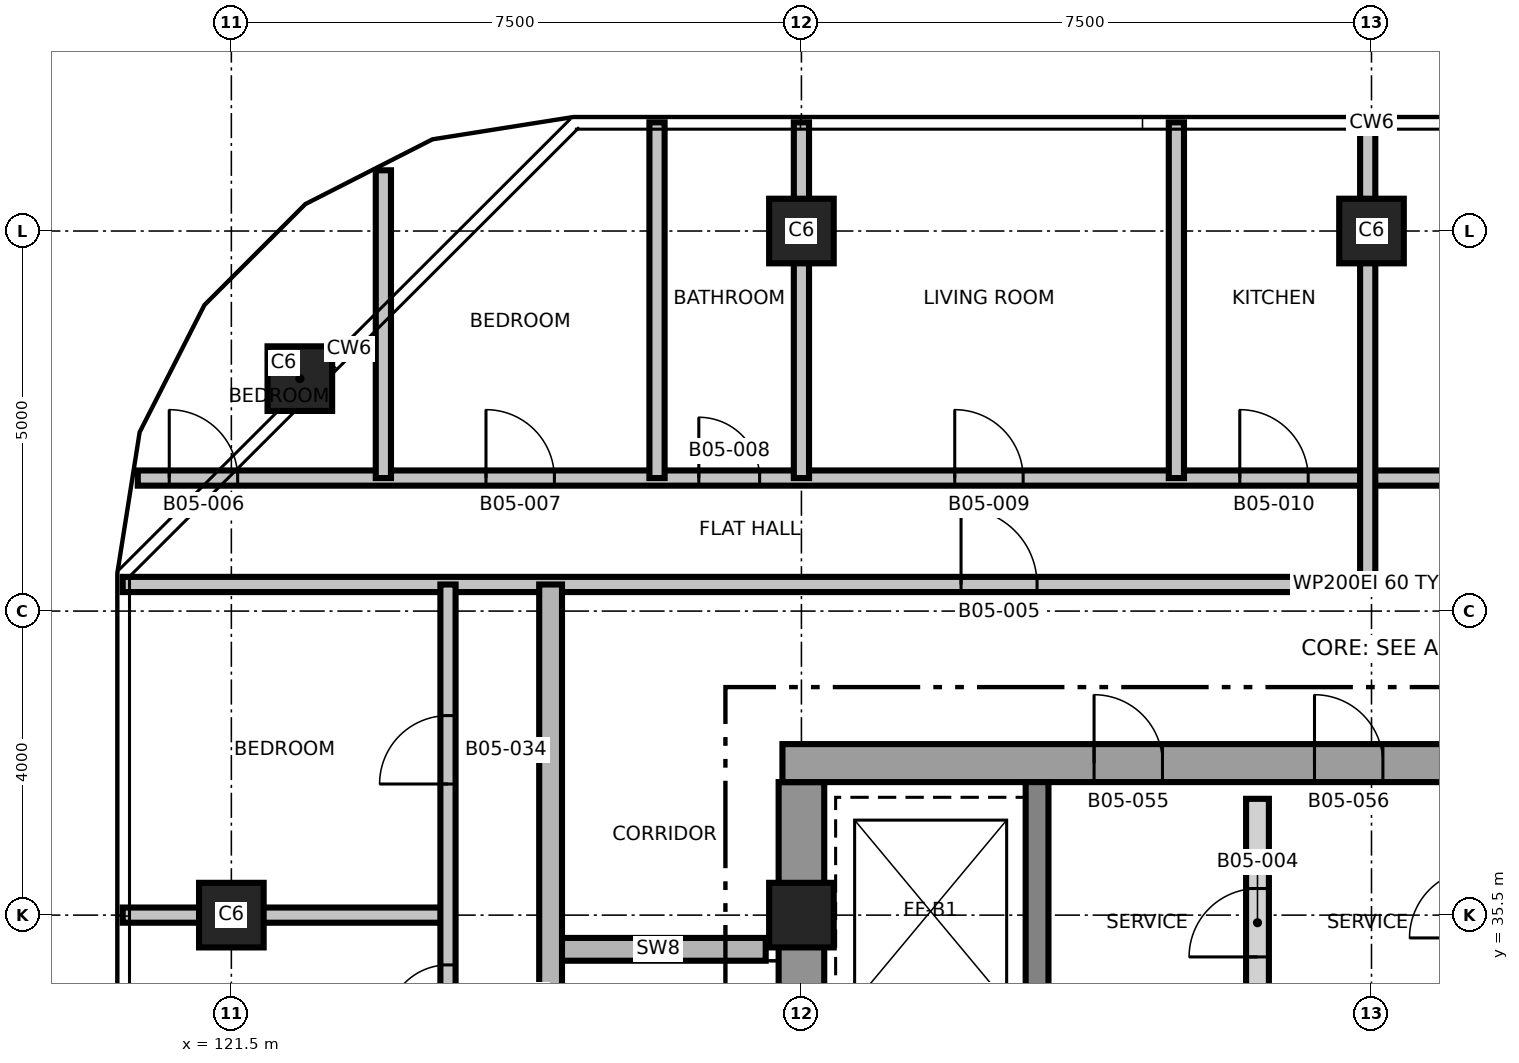
"""IFC4 building model, lengths in metres.
Left out: names, types, materials, properties, quantities, classifications, styles, units other than length and angle.
Written with IfcOpenShell. Run it as: python <this file> out.ifc"""

import sys

from ifc_helpers import new_model, si_unit, direction, frame, frame_2d, origin, origin_2d, place, context, subcontext, project, spatial, rectangle, extrude, element, fill, save


model = new_model("IFC4")
c1 = context("Model", 3, precision=1e-05, world=origin(), true_north=direction((0.0, 1.0)))
c2 = subcontext(c1, "Body", "Model", "MODEL_VIEW")
j1 = project(units=[si_unit("LENGTHUNIT", "METRE"), si_unit("PLANEANGLEUNIT", "RADIAN")], contexts=[c1])
p1 = place(None, origin())
s1 = spatial("IfcSite", under=j1, at=p1, CompositionType="ELEMENT")
p2 = place(p1, origin())
s2 = spatial("IfcBuilding", under=s1, at=p2, CompositionType="ELEMENT")
p3 = place(p2, frame((0.0, 0.0, 70.5)))
s3 = spatial("IfcBuildingStorey", under=s2, at=p3, CompositionType="ELEMENT", Elevation=70.5)
p4 = place(p3, frame((129.0, 24.75, 0.0), z_axis=(0.0, 0.0, 1.0), x_axis=(0.0, 1.0, 0.0)))
e1 = element("IfcWall", 1, at=p4, inside=s3, PredefinedType="SHEAR", context=c2, shape_type="SweptSolid", body=[
    extrude(rectangle(XDim=12.5, YDim=0.6, at=frame_2d((6.25, 0.0))), origin(), (0.0, 0.0, 1.0), 3.7),
])
p5 = place(p4, frame((5.15, 0.0, 0.0)))
e2 = element("IfcOpeningElement", 2, at=p5, cuts=e1, PredefinedType="OPENING", context=c2, shape_type="SweptSolid", body=[
    extrude(rectangle(XDim=1.0, YDim=2.1, at=frame_2d((0.5, 1.05))), frame((0.0, 0.31, 0.0), z_axis=(0.0, -1.0, 0.0), x_axis=(1.0, 0.0, 0.0)), (0.0, 0.0, 1.0), 0.62),
])
p6 = place(p3, frame((128.75, 37.5, 0.0), z_axis=(0.0, 0.0, 1.0), x_axis=(1.0, 0.0, 0.0)))
e3 = element("IfcWall", 3, at=p6, inside=s3, PredefinedType="SHEAR", context=c2, shape_type="SweptSolid", body=[
    extrude(rectangle(XDim=15.0, YDim=0.5, at=frame_2d((7.5, 0.0))), origin(), (0.0, 0.0, 1.0), 3.7),
])
p7 = place(p6, frame((9.65, 0.0, 0.0)))
e4 = element("IfcOpeningElement", 4, at=p7, cuts=e3, PredefinedType="OPENING", context=c2, shape_type="SweptSolid", body=[
    extrude(rectangle(XDim=1.5, YDim=2.1, at=frame_2d((0.75, 1.05))), frame((0.0, 0.26, 0.0), z_axis=(0.0, -1.0, 0.0), x_axis=(1.0, 0.0, 0.0)), (0.0, 0.0, 1.0), 0.52),
])
p8 = place(p6, frame((12.85, 0.0, 0.0)))
e5 = element("IfcOpeningElement", 5, at=p8, cuts=e3, PredefinedType="OPENING", context=c2, shape_type="SweptSolid", body=[
    extrude(rectangle(XDim=0.9, YDim=2.1, at=frame_2d((0.45, 1.05))), frame((0.0, 0.26, 0.0), z_axis=(0.0, -1.0, 0.0), x_axis=(1.0, 0.0, 0.0)), (0.0, 0.0, 1.0), 0.52),
])
p9 = place(p6, frame((4.1, 0.0, 0.0)))
e6 = element("IfcOpeningElement", 6, at=p9, cuts=e3, PredefinedType="OPENING", context=c2, shape_type="SweptSolid", body=[
    extrude(rectangle(XDim=0.9, YDim=2.1, at=frame_2d((0.45, 1.05))), frame((0.0, 0.26, 0.0), z_axis=(0.0, -1.0, 0.0), x_axis=(1.0, 0.0, 0.0)), (0.0, 0.0, 1.0), 0.52),
])
p10 = place(p6, frame((7.0, 0.0, 0.0)))
e7 = element("IfcOpeningElement", 7, at=p10, cuts=e3, PredefinedType="OPENING", context=c2, shape_type="SweptSolid", body=[
    extrude(rectangle(XDim=0.9, YDim=2.1, at=frame_2d((0.45, 1.05))), frame((0.0, 0.26, 0.0), z_axis=(0.0, -1.0, 0.0), x_axis=(1.0, 0.0, 0.0)), (0.0, 0.0, 1.0), 0.52),
])
p11 = place(p3, frame((132.1, 24.75, 0.0), z_axis=(0.0, 0.0, 1.0), x_axis=(0.0, 1.0, 0.0)))
e8 = element("IfcWall", 8, at=p11, inside=s3, PredefinedType="SHEAR", context=c2, shape_type="SweptSolid", body=[
    extrude(rectangle(XDim=12.5, YDim=0.3, at=frame_2d((6.25, 0.0))), origin(), (0.0, 0.0, 1.0), 3.7),
])
p12 = place(p11, frame((3.9, 0.0, 0.0)))
e9 = element("IfcOpeningElement", 9, at=p12, cuts=e8, PredefinedType="OPENING", context=c2, shape_type="SweptSolid", body=[
    extrude(rectangle(XDim=1.2, YDim=2.1, at=frame_2d((0.6, 1.05))), frame((0.0, 0.16, 0.0), z_axis=(0.0, -1.0, 0.0), x_axis=(1.0, 0.0, 0.0)), (0.0, 0.0, 1.0), 0.32),
])
for number, where, z_axis, x_axis in (
    (10, (121.5, 35.5, 0.0), (0.0, 0.0, 1.0), (1.0, 0.0, 0.0)),
    (11, (129.0, 35.5, 0.0), (0.0, 0.0, 1.0), (1.0, 0.0, 0.0)),
    (12, (122.401, 42.558, 0.0), (0.0, 0.0, 1.0), (1.0, 0.0, 0.0)),
    (13, (129.0, 44.5, 0.0), (0.0, 0.0, 1.0), (1.0, 0.0, 0.0)),
    (14, (136.5, 44.5, 0.0), (0.0, 0.0, 1.0), (1.0, 0.0, 0.0)),
):
    element("IfcColumn", number, at=place(p3, frame(where, z_axis=z_axis, x_axis=x_axis)), inside=s3, PredefinedType="COLUMN", context=c2, shape_type="SweptSolid", body=[
        extrude(rectangle(XDim=0.85, YDim=0.85, at=origin_2d()), origin(), (0.0, 0.0, 1.0), 3.7),
    ])
p13 = place(p3, frame((125.7, 35.05, 0.0), z_axis=(0.0, 0.0, 1.0), x_axis=(1.0, 0.0, 0.0)))
e15 = element("IfcWall", 15, at=p13, inside=s3, PredefinedType="SHEAR", context=c2, shape_type="SweptSolid", body=[
    extrude(rectangle(XDim=2.83, YDim=0.3, at=frame_2d((1.415, 0.0))), origin(), (0.0, 0.0, 1.0), 3.4),
])
p14 = place(p3, frame((120.07, 35.5, 0.0), z_axis=(0.0, 0.0, 1.0), x_axis=(1.0, 0.0, 0.0)))
e16 = element("IfcWall", 16, at=p14, inside=s3, PredefinedType="PARTITIONING", context=c2, shape_type="SweptSolid", body=[
    extrude(rectangle(XDim=4.28, YDim=0.2, at=frame_2d((2.14, 0.0))), origin(), (0.0, 0.0, 1.0), 3.4),
])
p15 = place(p3, frame((120.07, 39.85, 0.0), z_axis=(0.0, 0.0, 1.0), x_axis=(1.0, 0.0, 0.0)))
e17 = element("IfcWall", 17, at=p15, inside=s3, PredefinedType="PARTITIONING", context=c2, shape_type="SweptSolid", body=[
    extrude(rectangle(XDim=32.86, YDim=0.2, at=frame_2d((16.43, 0.0))), origin(), (0.0, 0.0, 1.0), 3.4),
])
p16 = place(p15, frame((11.03, 0.0, 0.0)))
e18 = element("IfcOpeningElement", 18, at=p16, cuts=e17, PredefinedType="OPENING", context=c2, shape_type="SweptSolid", body=[
    extrude(rectangle(XDim=1.0, YDim=2.1, at=frame_2d((0.5, 1.05))), frame((0.0, 0.11, 0.0), z_axis=(0.0, -1.0, 0.0), x_axis=(1.0, 0.0, 0.0)), (0.0, 0.0, 1.0), 0.22),
])
p17 = place(p15, frame((20.83, 0.0, 0.0)))
e19 = element("IfcOpeningElement", 19, at=p17, cuts=e17, PredefinedType="OPENING", context=c2, shape_type="SweptSolid", body=[
    extrude(rectangle(XDim=1.0, YDim=2.1, at=frame_2d((0.5, 1.05))), frame((0.0, 0.11, 0.0), z_axis=(0.0, -1.0, 0.0), x_axis=(1.0, 0.0, 0.0)), (0.0, 0.0, 1.0), 0.22),
])
p18 = place(p3, frame((120.269, 41.25, 0.0), z_axis=(0.0, 0.0, 1.0), x_axis=(1.0, 0.0, 0.0)))
e20 = element("IfcWall", 20, at=p18, inside=s3, PredefinedType="PARTITIONING", context=c2, shape_type="SweptSolid", body=[
    extrude(rectangle(XDim=32.462, YDim=0.2, at=frame_2d((16.231, 0.0))), origin(), (0.0, 0.0, 1.0), 3.4),
])
p19 = place(p18, frame((0.414, 0.0, 0.0)))
e21 = element("IfcOpeningElement", 21, at=p19, cuts=e20, PredefinedType="OPENING", context=c2, shape_type="SweptSolid", body=[
    extrude(rectangle(XDim=0.9, YDim=2.1, at=frame_2d((0.45, 1.05))), frame((0.0, 0.11, 0.0), z_axis=(0.0, -1.0, 0.0), x_axis=(1.0, 0.0, 0.0)), (0.0, 0.0, 1.0), 0.22),
])
p20 = place(p18, frame((4.581, 0.0, 0.0)))
e22 = element("IfcOpeningElement", 22, at=p20, cuts=e20, PredefinedType="OPENING", context=c2, shape_type="SweptSolid", body=[
    extrude(rectangle(XDim=0.9, YDim=2.1, at=frame_2d((0.45, 1.05))), frame((0.0, 0.11, 0.0), z_axis=(0.0, -1.0, 0.0), x_axis=(1.0, 0.0, 0.0)), (0.0, 0.0, 1.0), 0.22),
])
p21 = place(p18, frame((7.381, 0.0, 0.0)))
e23 = element("IfcOpeningElement", 23, at=p21, cuts=e20, PredefinedType="OPENING", context=c2, shape_type="SweptSolid", body=[
    extrude(rectangle(XDim=0.8, YDim=2.1, at=frame_2d((0.4, 1.05))), frame((0.0, 0.11, 0.0), z_axis=(0.0, -1.0, 0.0), x_axis=(1.0, 0.0, 0.0)), (0.0, 0.0, 1.0), 0.22),
])
p22 = place(p18, frame((10.748, 0.0, 0.0)))
e24 = element("IfcOpeningElement", 24, at=p22, cuts=e20, PredefinedType="OPENING", context=c2, shape_type="SweptSolid", body=[
    extrude(rectangle(XDim=0.9, YDim=2.1, at=frame_2d((0.45, 1.05))), frame((0.0, 0.11, 0.0), z_axis=(0.0, -1.0, 0.0), x_axis=(1.0, 0.0, 0.0)), (0.0, 0.0, 1.0), 0.22),
])
p23 = place(p18, frame((14.498, 0.0, 0.0)))
e25 = element("IfcOpeningElement", 25, at=p23, cuts=e20, PredefinedType="OPENING", context=c2, shape_type="SweptSolid", body=[
    extrude(rectangle(XDim=0.9, YDim=2.1, at=frame_2d((0.45, 1.05))), frame((0.0, 0.11, 0.0), z_axis=(0.0, -1.0, 0.0), x_axis=(1.0, 0.0, 0.0)), (0.0, 0.0, 1.0), 0.22),
])
p24 = place(p18, frame((18.248, 0.0, 0.0)))
e26 = element("IfcOpeningElement", 26, at=p24, cuts=e20, PredefinedType="OPENING", context=c2, shape_type="SweptSolid", body=[
    extrude(rectangle(XDim=0.9, YDim=2.1, at=frame_2d((0.45, 1.05))), frame((0.0, 0.11, 0.0), z_axis=(0.0, -1.0, 0.0), x_axis=(1.0, 0.0, 0.0)), (0.0, 0.0, 1.0), 0.22),
])
p25 = place(p18, frame((21.998, 0.0, 0.0)))
e27 = element("IfcOpeningElement", 27, at=p25, cuts=e20, PredefinedType="OPENING", context=c2, shape_type="SweptSolid", body=[
    extrude(rectangle(XDim=0.9, YDim=2.1, at=frame_2d((0.45, 1.05))), frame((0.0, 0.11, 0.0), z_axis=(0.0, -1.0, 0.0), x_axis=(1.0, 0.0, 0.0)), (0.0, 0.0, 1.0), 0.22),
])
p26 = place(p18, frame((24.842, 0.0, 0.0)))
e28 = element("IfcOpeningElement", 28, at=p26, cuts=e20, PredefinedType="OPENING", context=c2, shape_type="SweptSolid", body=[
    extrude(rectangle(XDim=0.8, YDim=2.1, at=frame_2d((0.4, 1.05))), frame((0.0, 0.11, 0.0), z_axis=(0.0, -1.0, 0.0), x_axis=(1.0, 0.0, 0.0)), (0.0, 0.0, 1.0), 0.22),
])
p27 = place(p18, frame((28.659, 0.0, 0.0)))
e29 = element("IfcOpeningElement", 29, at=p27, cuts=e20, PredefinedType="OPENING", context=c2, shape_type="SweptSolid", body=[
    extrude(rectangle(XDim=0.9, YDim=2.1, at=frame_2d((0.45, 1.05))), frame((0.0, 0.11, 0.0), z_axis=(0.0, -1.0, 0.0), x_axis=(1.0, 0.0, 0.0)), (0.0, 0.0, 1.0), 0.22),
])
p28 = place(p3, frame((123.5, 41.25, 0.0), z_axis=(0.0, 0.0, 1.0), x_axis=(0.0, 1.0, 0.0)))
e30 = element("IfcWall", 30, at=p28, inside=s3, PredefinedType="PARTITIONING", context=c2, shape_type="SweptSolid", body=[
    extrude(rectangle(XDim=4.049, YDim=0.2, at=frame_2d((2.024, 0.0))), origin(), (0.0, 0.0, 1.0), 3.4),
])
p29 = place(p3, frame((124.35, 22.15, 0.0), z_axis=(0.0, 0.0, 1.0), x_axis=(0.0, 1.0, 0.0)))
e31 = element("IfcWall", 31, at=p29, inside=s3, PredefinedType="PARTITIONING", context=c2, shape_type="SweptSolid", body=[
    extrude(rectangle(XDim=17.7, YDim=0.2, at=frame_2d((8.85, 0.0))), origin(), (0.0, 0.0, 1.0), 3.4),
])
p30 = place(p29, frame((1.028, 0.0, 0.0)))
e32 = element("IfcOpeningElement", 32, at=p30, cuts=e31, PredefinedType="OPENING", context=c2, shape_type="SweptSolid", body=[
    extrude(rectangle(XDim=0.9, YDim=2.1, at=frame_2d((0.45, 1.05))), frame((0.0, 0.11, 0.0), z_axis=(0.0, -1.0, 0.0), x_axis=(1.0, 0.0, 0.0)), (0.0, 0.0, 1.0), 0.22),
])
p31 = place(p29, frame((3.253, 0.0, 0.0)))
e33 = element("IfcOpeningElement", 33, at=p31, cuts=e31, PredefinedType="OPENING", context=c2, shape_type="SweptSolid", body=[
    extrude(rectangle(XDim=0.8, YDim=2.1, at=frame_2d((0.4, 1.05))), frame((0.0, 0.11, 0.0), z_axis=(0.0, -1.0, 0.0), x_axis=(1.0, 0.0, 0.0)), (0.0, 0.0, 1.0), 0.22),
])
p32 = place(p29, frame((6.195, 0.0, 0.0)))
e34 = element("IfcOpeningElement", 34, at=p32, cuts=e31, PredefinedType="OPENING", context=c2, shape_type="SweptSolid", body=[
    extrude(rectangle(XDim=0.9, YDim=2.1, at=frame_2d((0.45, 1.05))), frame((0.0, 0.11, 0.0), z_axis=(0.0, -1.0, 0.0), x_axis=(1.0, 0.0, 0.0)), (0.0, 0.0, 1.0), 0.22),
])
p33 = place(p29, frame((9.641, 0.0, 0.0)))
e35 = element("IfcOpeningElement", 35, at=p33, cuts=e31, PredefinedType="OPENING", context=c2, shape_type="SweptSolid", body=[
    extrude(rectangle(XDim=0.9, YDim=2.1, at=frame_2d((0.45, 1.05))), frame((0.0, 0.11, 0.0), z_axis=(0.0, -1.0, 0.0), x_axis=(1.0, 0.0, 0.0)), (0.0, 0.0, 1.0), 0.22),
])
p34 = place(p29, frame((11.895, 0.0, 0.0)))
e36 = element("IfcOpeningElement", 36, at=p34, cuts=e31, PredefinedType="OPENING", context=c2, shape_type="SweptSolid", body=[
    extrude(rectangle(XDim=0.8, YDim=2.1, at=frame_2d((0.4, 1.05))), frame((0.0, 0.11, 0.0), z_axis=(0.0, -1.0, 0.0), x_axis=(1.0, 0.0, 0.0)), (0.0, 0.0, 1.0), 0.22),
])
p35 = place(p29, frame((15.075, 0.0, 0.0)))
e37 = element("IfcOpeningElement", 37, at=p35, cuts=e31, PredefinedType="OPENING", context=c2, shape_type="SweptSolid", body=[
    extrude(rectangle(XDim=0.9, YDim=2.1, at=frame_2d((0.45, 1.05))), frame((0.0, 0.11, 0.0), z_axis=(0.0, -1.0, 0.0), x_axis=(1.0, 0.0, 0.0)), (0.0, 0.0, 1.0), 0.22),
])
p36 = place(p3, frame((125.7, 22.15, 0.0), z_axis=(0.0, 0.0, 1.0), x_axis=(0.0, 1.0, 0.0)))
e38 = element("IfcWall", 38, at=p36, inside=s3, PredefinedType="SHEAR", context=c2, shape_type="SweptSolid", body=[
    extrude(rectangle(XDim=17.7, YDim=0.3, at=frame_2d((8.85, 0.0))), origin(), (0.0, 0.0, 1.0), 3.4),
])
p37 = place(p36, frame((2.7, 0.0, 0.0)))
e39 = element("IfcOpeningElement", 39, at=p37, cuts=e38, PredefinedType="OPENING", context=c2, shape_type="SweptSolid", body=[
    extrude(rectangle(XDim=1.0, YDim=2.1, at=frame_2d((0.5, 1.05))), frame((0.0, 0.16, 0.0), z_axis=(0.0, -1.0, 0.0), x_axis=(1.0, 0.0, 0.0)), (0.0, 0.0, 1.0), 0.32),
])
for number, where, z_axis, x_axis in (
    (40, (127.1, 41.25, 0.0), (0.0, 0.0, 1.0), (0.0, 1.0, 0.0)),
    (41, (129.0, 41.25, 0.0), (0.0, 0.0, 1.0), (0.0, 1.0, 0.0)),
    (42, (133.933, 41.25, 0.0), (0.0, 0.0, 1.0), (0.0, 1.0, 0.0)),
):
    element("IfcWall", number, at=place(p3, frame(where, z_axis=z_axis, x_axis=x_axis)), inside=s3, PredefinedType="PARTITIONING", context=c2, shape_type="SweptSolid", body=[
        extrude(rectangle(XDim=4.68, YDim=0.2, at=frame_2d((2.34, 0.0))), origin(), (0.0, 0.0, 1.0), 3.4),
    ])
p38 = place(p3, frame((135.0, 33.77, 0.0), z_axis=(0.0, 0.0, 1.0), x_axis=(0.0, 1.0, 0.0)))
e43 = element("IfcWall", 43, at=p38, inside=s3, PredefinedType="PARTITIONING", context=c2, shape_type="SweptSolid", body=[
    extrude(rectangle(XDim=3.26, YDim=0.3, at=frame_2d((1.63, 0.0))), origin(), (0.0, 0.0, 1.0), 3.4),
])
p39 = place(p38, frame((1.18, 0.0, 0.0)))
e44 = element("IfcOpeningElement", 44, at=p39, cuts=e43, PredefinedType="OPENING", context=c2, shape_type="SweptSolid", body=[
    extrude(rectangle(XDim=0.9, YDim=2.1, at=frame_2d((0.45, 1.05))), frame((0.0, 0.16, 0.0), z_axis=(0.0, -1.0, 0.0), x_axis=(1.0, 0.0, 0.0)), (0.0, 0.0, 1.0), 0.32),
])
p40 = place(p3, frame((136.45, 39.85, 0.0), z_axis=(0.0, 0.0, 1.0), x_axis=(0.0, 1.0, 0.0)))
e45 = element("IfcWall", 45, at=p40, inside=s3, PredefinedType="PARTITIONING", context=c2, shape_type="SweptSolid", body=[
    extrude(rectangle(XDim=6.08, YDim=0.2, at=frame_2d((3.04, 0.0))), origin(), (0.0, 0.0, 1.0), 3.4),
])
p41 = place(p39, origin())
e46 = element("IfcDoor", 46, at=p41, inside=s3, OperationType="SINGLE_SWING_RIGHT", PredefinedType="DOOR", context=c2, shape_type="SweptSolid", body=[
    extrude(rectangle(XDim=0.9, YDim=2.1, at=frame_2d((0.45, 1.05))), frame((0.0, 0.025, 0.0), z_axis=(0.0, -1.0, 0.0), x_axis=(1.0, 0.0, 0.0)), (0.0, 0.0, 1.0), 0.05),
])
fill(e44, e46)
p42 = place(p16, origin())
e47 = element("IfcDoor", 47, at=p42, inside=s3, OperationType="SINGLE_SWING_LEFT", PredefinedType="DOOR", context=c2, shape_type="SweptSolid", body=[
    extrude(rectangle(XDim=1.0, YDim=2.1, at=frame_2d((0.5, 1.05))), frame((0.0, 0.025, 0.0), z_axis=(0.0, -1.0, 0.0), x_axis=(1.0, 0.0, 0.0)), (0.0, 0.0, 1.0), 0.05),
])
fill(e18, e47)
p43 = place(p19, origin())
e48 = element("IfcDoor", 48, at=p43, inside=s3, OperationType="SINGLE_SWING_RIGHT", PredefinedType="DOOR", context=c2, shape_type="SweptSolid", body=[
    extrude(rectangle(XDim=0.9, YDim=2.1, at=frame_2d((0.45, 1.05))), frame((0.0, 0.025, 0.0), z_axis=(0.0, -1.0, 0.0), x_axis=(1.0, 0.0, 0.0)), (0.0, 0.0, 1.0), 0.05),
])
fill(e21, e48)
p44 = place(p20, origin())
e49 = element("IfcDoor", 49, at=p44, inside=s3, OperationType="SINGLE_SWING_LEFT", PredefinedType="DOOR", context=c2, shape_type="SweptSolid", body=[
    extrude(rectangle(XDim=0.9, YDim=2.1, at=frame_2d((0.45, 1.05))), frame((0.0, 0.025, 0.0), z_axis=(0.0, -1.0, 0.0), x_axis=(1.0, 0.0, 0.0)), (0.0, 0.0, 1.0), 0.05),
])
fill(e22, e49)
p45 = place(p21, origin())
e50 = element("IfcDoor", 50, at=p45, inside=s3, OperationType="SINGLE_SWING_RIGHT", PredefinedType="DOOR", context=c2, shape_type="SweptSolid", body=[
    extrude(rectangle(XDim=0.8, YDim=2.1, at=frame_2d((0.4, 1.05))), frame((0.0, 0.025, 0.0), z_axis=(0.0, -1.0, 0.0), x_axis=(1.0, 0.0, 0.0)), (0.0, 0.0, 1.0), 0.05),
])
fill(e23, e50)
p46 = place(p22, origin())
e51 = element("IfcDoor", 51, at=p46, inside=s3, OperationType="SINGLE_SWING_LEFT", PredefinedType="DOOR", context=c2, shape_type="SweptSolid", body=[
    extrude(rectangle(XDim=0.9, YDim=2.1, at=frame_2d((0.45, 1.05))), frame((0.0, 0.025, 0.0), z_axis=(0.0, -1.0, 0.0), x_axis=(1.0, 0.0, 0.0)), (0.0, 0.0, 1.0), 0.05),
])
fill(e24, e51)
p47 = place(p23, origin())
e52 = element("IfcDoor", 52, at=p47, inside=s3, OperationType="SINGLE_SWING_RIGHT", PredefinedType="DOOR", context=c2, shape_type="SweptSolid", body=[
    extrude(rectangle(XDim=0.9, YDim=2.1, at=frame_2d((0.45, 1.05))), frame((0.0, 0.025, 0.0), z_axis=(0.0, -1.0, 0.0), x_axis=(1.0, 0.0, 0.0)), (0.0, 0.0, 1.0), 0.05),
])
fill(e25, e52)
p48 = place(p34, origin())
e53 = element("IfcDoor", 53, at=p48, inside=s3, OperationType="SINGLE_SWING_LEFT", PredefinedType="DOOR", context=c2, shape_type="SweptSolid", body=[
    extrude(rectangle(XDim=0.8, YDim=2.1, at=frame_2d((0.4, 1.05))), frame((0.0, 0.025, 0.0), z_axis=(0.0, -1.0, 0.0), x_axis=(1.0, 0.0, 0.0)), (0.0, 0.0, 1.0), 0.05),
])
fill(e36, e53)
p49 = place(p35, origin())
e54 = element("IfcDoor", 54, at=p49, inside=s3, OperationType="SINGLE_SWING_RIGHT", PredefinedType="DOOR", context=c2, shape_type="SweptSolid", body=[
    extrude(rectangle(XDim=0.9, YDim=2.1, at=frame_2d((0.45, 1.05))), frame((0.0, 0.025, 0.0), z_axis=(0.0, -1.0, 0.0), x_axis=(1.0, 0.0, 0.0)), (0.0, 0.0, 1.0), 0.05),
])
fill(e37, e54)
p50 = place(p9, origin())
e55 = element("IfcDoor", 55, at=p50, inside=s3, OperationType="SINGLE_SWING_LEFT", PredefinedType="DOOR", context=c2, shape_type="SweptSolid", body=[
    extrude(rectangle(XDim=0.9, YDim=2.1, at=frame_2d((0.45, 1.05))), frame((0.0, 0.025, 0.0), z_axis=(0.0, -1.0, 0.0), x_axis=(1.0, 0.0, 0.0)), (0.0, 0.0, 1.0), 0.05),
])
fill(e6, e55)
p51 = place(p10, origin())
e56 = element("IfcDoor", 56, at=p51, inside=s3, OperationType="SINGLE_SWING_RIGHT", PredefinedType="DOOR", context=c2, shape_type="SweptSolid", body=[
    extrude(rectangle(XDim=0.9, YDim=2.1, at=frame_2d((0.45, 1.05))), frame((0.0, 0.025, 0.0), z_axis=(0.0, -1.0, 0.0), x_axis=(1.0, 0.0, 0.0)), (0.0, 0.0, 1.0), 0.05),
])
fill(e7, e56)
save(model, sys.argv[1])
